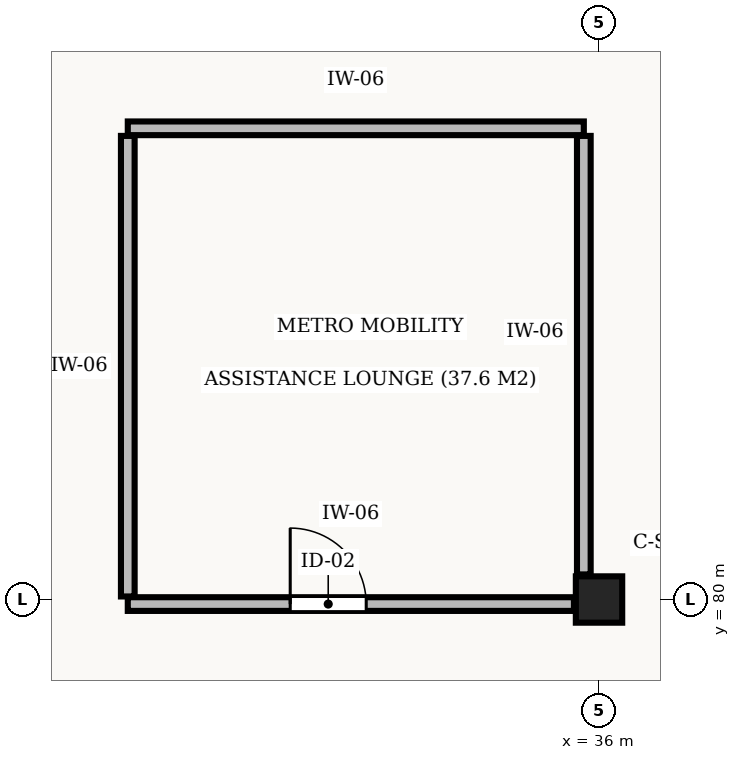
"""IFC4 building model, lengths in metres.
Left out: names, types, materials, properties, quantities, classifications, styles, units other than length and angle.
Written with IfcOpenShell. Run it as: python <this file> out.ifc"""

import sys

from ifc_helpers import new_model, si_unit, direction, frame, frame_2d, origin, origin_2d, place, context, subcontext, project, spatial, rectangle, hollow_circle, extrude, element, fill, save


model = new_model("IFC4")
c1 = context("Model", 3, precision=1e-05, world=origin(), true_north=direction((0.0, 1.0)))
c2 = subcontext(c1, "Body", "Model", "MODEL_VIEW")
j1 = project(units=[si_unit("LENGTHUNIT", "METRE"), si_unit("PLANEANGLEUNIT", "RADIAN")], contexts=[c1])
p1 = place(None, origin())
s1 = spatial("IfcSite", under=j1, at=p1, CompositionType="ELEMENT")
p2 = place(p1, origin())
s2 = spatial("IfcBuilding", under=s1, at=p2, CompositionType="ELEMENT")
p3 = place(p2, origin())
s3 = spatial("IfcBuildingStorey", under=s2, at=p3, CompositionType="ELEMENT", Elevation=0.0)
p4 = place(p3, frame((36.0, 80.0, 0.0), z_axis=(0.0, 0.0, 1.0), x_axis=(1.0, 0.0, 0.0)))
e1 = element("IfcColumn", 1, at=p4, inside=s3, PredefinedType="COLUMN", context=c2, shape_type="SweptSolid", body=[
    extrude(hollow_circle(Radius=0.305, WallThickness=0.02, at=origin_2d()), origin(), (0.0, 0.0, 1.0), 5.4),
])
p5 = place(p3, frame((29.8, 79.94, 0.0), z_axis=(0.0, 0.0, 1.0), x_axis=(1.0, 0.0, 0.0)))
e2 = element("IfcWall", 2, at=p5, inside=s3, PredefinedType="STANDARD", context=c2, shape_type="SweptSolid", body=[
    extrude(rectangle(XDim=5.87, YDim=0.18, at=frame_2d((2.935, 0.0))), origin(), (0.0, 0.0, 1.0), 4.18),
])
p6 = place(p5, frame((2.137, 0.0, 0.0)))
e3 = element("IfcOpeningElement", 3, at=p6, cuts=e2, PredefinedType="OPENING", context=c2, shape_type="SweptSolid", body=[
    extrude(rectangle(XDim=1.0, YDim=2.1, at=frame_2d((0.5, 1.05))), frame((0.0, 0.102, 0.0), z_axis=(0.0, -1.0, 0.0), x_axis=(1.0, 0.0, 0.0)), (0.0, 0.0, 1.0), 0.204),
])
p7 = place(p3, frame((29.8, 86.2, 0.0), z_axis=(0.0, 0.0, 1.0), x_axis=(1.0, 0.0, 0.0)))
e4 = element("IfcWall", 4, at=p7, inside=s3, PredefinedType="STANDARD", context=c2, shape_type="SweptSolid", body=[
    extrude(rectangle(XDim=6.0, YDim=0.18, at=frame_2d((3.0, 0.0))), origin(), (0.0, 0.0, 1.0), 5.05),
])
p8 = place(p3, frame((29.8, 80.04, 0.0), z_axis=(0.0, 0.0, 1.0), x_axis=(0.0, 1.0, 0.0)))
e5 = element("IfcWall", 5, at=p8, inside=s3, PredefinedType="STANDARD", context=c2, shape_type="SweptSolid", body=[
    extrude(rectangle(XDim=6.06, YDim=0.18, at=frame_2d((3.03, 0.0))), origin(), (0.0, 0.0, 1.0), 5.05),
])
p9 = place(p3, frame((35.8, 80.33, 0.0), z_axis=(0.0, 0.0, 1.0), x_axis=(0.0, 1.0, 0.0)))
e6 = element("IfcWall", 6, at=p9, inside=s3, PredefinedType="STANDARD", context=c2, shape_type="SweptSolid", body=[
    extrude(rectangle(XDim=5.77, YDim=0.18, at=frame_2d((2.885, 0.0))), origin(), (0.0, 0.0, 1.0), 4.33),
])
p10 = place(p6, origin())
e7 = element("IfcDoor", 7, at=p10, inside=s3, OperationType="SINGLE_SWING_LEFT", PredefinedType="DOOR", context=c2, shape_type="SweptSolid", body=[
    extrude(rectangle(XDim=1.0, YDim=2.1, at=frame_2d((0.5, 1.05))), frame((0.0, 0.025, 0.0), z_axis=(0.0, -1.0, 0.0), x_axis=(1.0, 0.0, 0.0)), (0.0, 0.0, 1.0), 0.05),
])
fill(e3, e7)
save(model, sys.argv[1])
